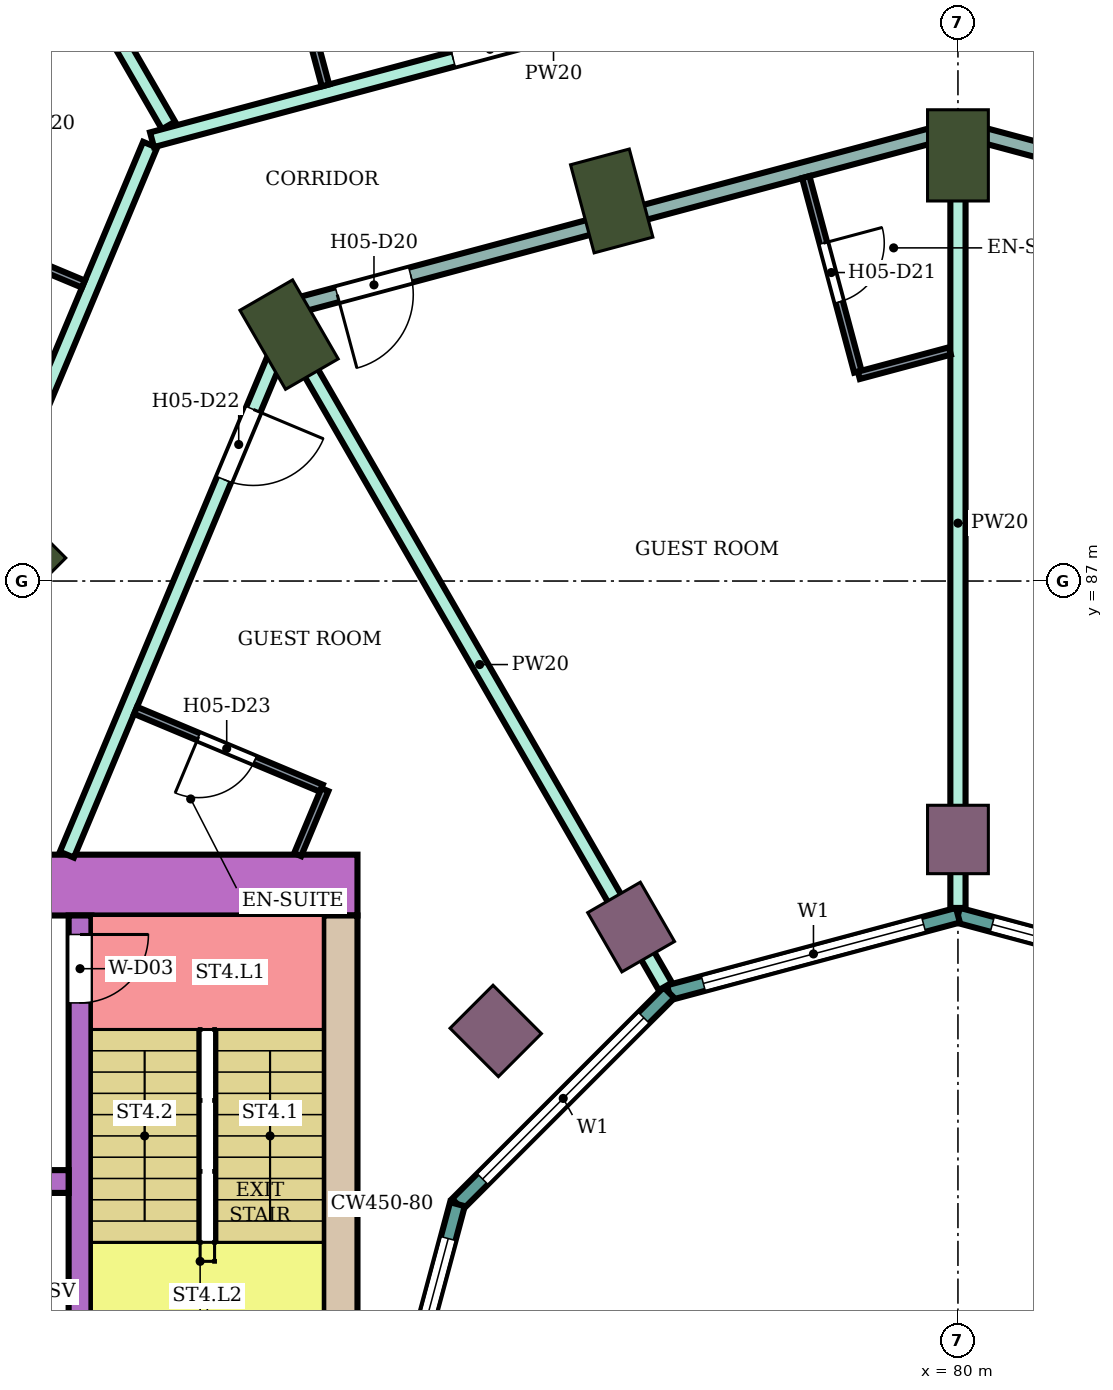
"""IFC4 building model, lengths in metres.
Left out: names, types, materials, properties, quantities, classifications, styles, units other than length and angle.
Written with IfcOpenShell. Run it as: python <this file> out.ifc"""

import sys

from ifc_helpers import new_model, si_unit, direction, frame, frame_2d, origin, origin_2d, place, context, subcontext, project, spatial, rectangle, extrude, element, fill, save


model = new_model("IFC4")
c1 = context("Model", 3, precision=1e-05, world=origin(), true_north=direction((0.0, 1.0)))
c2 = subcontext(c1, "Body", "Model", "MODEL_VIEW")
j1 = project(units=[si_unit("LENGTHUNIT", "METRE"), si_unit("PLANEANGLEUNIT", "RADIAN")], contexts=[c1])
p1 = place(None, origin())
s1 = spatial("IfcSite", under=j1, at=p1, CompositionType="ELEMENT")
p2 = place(p1, origin())
s2 = spatial("IfcBuilding", under=s1, at=p2, CompositionType="ELEMENT")
p3 = place(p2, frame((0.0, 0.0, 90.0)))
s3 = spatial("IfcBuildingStorey", under=s2, at=p3, CompositionType="ELEMENT", Elevation=90.0)
for number, where, z_axis, x_axis in (
    (1, (80.0, 92.6, 0.0), (0.0, 0.0, 1.0), (0.0, 1.0, 0.0)),
    (2, (75.445, 92.0, 0.0), (0.0, 0.0, 1.0), (-0.259, 0.966, 0.0)),
    (3, (71.2, 90.242, 0.0), (0.0, 0.0, 1.0), (-0.5, 0.866, 0.0)),
    (4, (67.555, 87.445, 0.0), (0.0, 0.0, 1.0), (-0.707, 0.707, 0.0)),
):
    element("IfcColumn", number, at=place(p3, frame(where, z_axis=z_axis, x_axis=x_axis)), inside=s3, PredefinedType="COLUMN", context=c2, shape_type="SweptSolid", body=[
        extrude(rectangle(XDim=1.2, YDim=0.8, at=origin_2d()), origin(), (0.0, 0.0, 1.0), 3.8),
    ])
for number, where, z_axis, x_axis in (
    (5, (80.0, 83.6, 0.0), (0.0, 0.0, 1.0), (0.0, 1.0, 0.0)),
    (6, (75.7, 82.448, 0.0), (0.0, 0.0, 1.0), (-0.5, 0.866, 0.0)),
    (7, (73.919, 81.081, 0.0), (0.0, 0.0, 1.0), (-0.707, 0.707, 0.0)),
):
    element("IfcColumn", number, at=place(p3, frame(where, z_axis=z_axis, x_axis=x_axis)), inside=s3, PredefinedType="COLUMN", context=c2, shape_type="SweptSolid", body=[
        extrude(rectangle(XDim=0.9, YDim=0.8, at=origin_2d()), origin(), (0.0, 0.0, 1.0), 3.8),
    ])
p4 = place(p3, frame((72.1, 83.0, 0.0), z_axis=(0.0, 0.0, 1.0), x_axis=(-1.0, 0.0, 0.0)))
e8 = element("IfcWall", 8, at=p4, inside=s3, PredefinedType="SHEAR", context=c2, shape_type="SweptSolid", body=[
    extrude(rectangle(XDim=14.7, YDim=0.8, at=frame_2d((7.35, 0.0))), origin(), (0.0, 0.0, 1.0), 3.48),
])
p5 = place(p4, frame((4.2, 0.0, 0.0)))
e9 = element("IfcOpeningElement", 9, at=p5, cuts=e8, PredefinedType="OPENING", context=c2, shape_type="SweptSolid", body=[
    extrude(rectangle(XDim=2.4, YDim=2.4, at=frame_2d((1.2, 1.2))), frame((0.0, 0.41, 0.0), z_axis=(0.0, -1.0, 0.0), x_axis=(1.0, 0.0, 0.0)), (0.0, 0.0, 1.0), 0.82),
])
p6 = place(p3, frame((71.875, 82.6, 0.0), z_axis=(0.0, 0.0, 1.0), x_axis=(0.0, -1.0, 0.0)))
e10 = element("IfcWall", 10, at=p6, inside=s3, PredefinedType="SHEAR", context=c2, shape_type="SweptSolid", body=[
    extrude(rectangle(XDim=7.6, YDim=0.45, at=frame_2d((3.8, 0.0))), origin(), (0.0, 0.0, 1.0), 3.48),
])
p7 = place(p3, frame((68.45, 82.6, 0.0), z_axis=(0.0, 0.0, 1.0), x_axis=(0.0, -1.0, 0.0)))
e11 = element("IfcWall", 11, at=p7, inside=s3, PredefinedType="SHEAR", context=c2, shape_type="SweptSolid", body=[
    extrude(rectangle(XDim=7.6, YDim=0.3, at=frame_2d((3.8, 0.0))), origin(), (0.0, 0.0, 1.0), 3.48),
])
p8 = place(p7, frame((0.25, 0.0, 0.0)))
e12 = element("IfcOpeningElement", 12, at=p8, cuts=e11, PredefinedType="OPENING", context=c2, shape_type="SweptSolid", body=[
    extrude(rectangle(XDim=0.9, YDim=2.1, at=frame_2d((0.45, 1.05))), frame((0.0, 0.16, 0.0), z_axis=(0.0, -1.0, 0.0), x_axis=(1.0, 0.0, 0.0)), (0.0, 0.0, 1.0), 0.32),
])
p9 = place(p3, frame((68.3, 79.1, 0.0), z_axis=(0.0, 0.0, 1.0), x_axis=(-1.0, 0.0, 0.0)))
e13 = element("IfcWall", 13, at=p9, inside=s3, PredefinedType="SHEAR", context=c2, shape_type="SweptSolid", body=[
    extrude(rectangle(XDim=10.9, YDim=0.3, at=frame_2d((5.45, 0.0))), origin(), (0.0, 0.0, 1.0), 3.48),
])
p10 = place(p9, frame((0.4, 0.0, 0.0)))
e14 = element("IfcOpeningElement", 14, at=p10, cuts=e13, PredefinedType="OPENING", context=c2, shape_type="SweptSolid", body=[
    extrude(rectangle(XDim=1.4, YDim=2.1, at=frame_2d((0.7, 1.05))), frame((0.0, 0.16, 0.0), z_axis=(0.0, -1.0, 0.0), x_axis=(1.0, 0.0, 0.0)), (0.0, 0.0, 1.0), 0.32),
])
p11 = place(p9, frame((5.4, 0.0, 0.0)))
e15 = element("IfcOpeningElement", 15, at=p11, cuts=e13, PredefinedType="OPENING", context=c2, shape_type="SweptSolid", body=[
    extrude(rectangle(XDim=1.4, YDim=2.1, at=frame_2d((0.7, 1.05))), frame((0.0, 0.16, 0.0), z_axis=(0.0, -1.0, 0.0), x_axis=(1.0, 0.0, 0.0)), (0.0, 0.0, 1.0), 0.32),
])
p12 = place(p9, frame((8.1, 0.0, 0.0)))
e16 = element("IfcOpeningElement", 16, at=p12, cuts=e13, PredefinedType="OPENING", context=c2, shape_type="SweptSolid", body=[
    extrude(rectangle(XDim=1.0, YDim=2.1, at=frame_2d((0.5, 1.05))), frame((0.0, 0.16, 0.0), z_axis=(0.0, -1.0, 0.0), x_axis=(1.0, 0.0, 0.0)), (0.0, 0.0, 1.0), 0.32),
])
p13 = place(p3, frame((83.802, 81.585, 0.0), z_axis=(0.0, 0.0, 1.0), x_axis=(-0.965933654434, 0.258789828301, 0.0)))
e17 = element("IfcWall", 17, at=p13, inside=s3, PredefinedType="NOTDEFINED", context=c2, shape_type="SweptSolid", body=[
    extrude(rectangle(XDim=3.936, YDim=0.2, at=frame_2d((1.968, 0.0))), origin(), (0.0, 0.0, 1.0), 3.8),
])
p14 = place(p13, frame((0.468, 0.0, 0.9)))
e18 = element("IfcOpeningElement", 18, at=p14, cuts=e17, PredefinedType="OPENING", context=c2, shape_type="SweptSolid", body=[
    extrude(rectangle(XDim=3.0, YDim=2.3, at=frame_2d((1.5, 1.15))), frame((0.0, 0.11, 0.0), z_axis=(0.0, -1.0, 0.0), x_axis=(1.0, 0.0, 0.0)), (0.0, 0.0, 1.0), 0.22),
])
p15 = place(p3, frame((80.0, 82.604, 0.0), z_axis=(0.0, 0.0, 1.0), x_axis=(-0.965933654434, -0.258789828301, 0.0)))
e19 = element("IfcWall", 19, at=p15, inside=s3, PredefinedType="NOTDEFINED", context=c2, shape_type="SweptSolid", body=[
    extrude(rectangle(XDim=3.936, YDim=0.2, at=frame_2d((1.968, 0.0))), origin(), (0.0, 0.0, 1.0), 3.8),
])
p16 = place(p15, frame((0.468, 0.0, 0.9)))
e20 = element("IfcOpeningElement", 20, at=p16, cuts=e19, PredefinedType="OPENING", context=c2, shape_type="SweptSolid", body=[
    extrude(rectangle(XDim=3.0, YDim=2.3, at=frame_2d((1.5, 1.15))), frame((0.0, 0.11, 0.0), z_axis=(0.0, -1.0, 0.0), x_axis=(1.0, 0.0, 0.0)), (0.0, 0.0, 1.0), 0.22),
])
p17 = place(p3, frame((76.198, 81.585, 0.0), z_axis=(0.0, 0.0, 1.0), x_axis=(-0.707106781187, -0.707106781187, 0.0)))
e21 = element("IfcWall", 21, at=p17, inside=s3, PredefinedType="NOTDEFINED", context=c2, shape_type="SweptSolid", body=[
    extrude(rectangle(XDim=3.936, YDim=0.2, at=frame_2d((1.968, 0.0))), origin(), (0.0, 0.0, 1.0), 3.8),
])
p18 = place(p17, frame((0.468, 0.0, 0.9)))
e22 = element("IfcOpeningElement", 22, at=p18, cuts=e21, PredefinedType="OPENING", context=c2, shape_type="SweptSolid", body=[
    extrude(rectangle(XDim=3.0, YDim=2.3, at=frame_2d((1.5, 1.15))), frame((0.0, 0.11, 0.0), z_axis=(0.0, -1.0, 0.0), x_axis=(1.0, 0.0, 0.0)), (0.0, 0.0, 1.0), 0.22),
])
p19 = place(p3, frame((73.415, 78.802, 0.0), z_axis=(0.0, 0.0, 1.0), x_axis=(-0.258789828301, -0.965933654434, 0.0)))
e23 = element("IfcWall", 23, at=p19, inside=s3, PredefinedType="NOTDEFINED", context=c2, shape_type="SweptSolid", body=[
    extrude(rectangle(XDim=3.936, YDim=0.2, at=frame_2d((1.968, 0.0))), origin(), (0.0, 0.0, 1.0), 3.8),
])
p20 = place(p19, frame((0.468, 0.0, 0.9)))
e24 = element("IfcOpeningElement", 24, at=p20, cuts=e23, PredefinedType="OPENING", context=c2, shape_type="SweptSolid", body=[
    extrude(rectangle(XDim=3.0, YDim=2.3, at=frame_2d((1.5, 1.15))), frame((0.0, 0.11, 0.0), z_axis=(0.0, -1.0, 0.0), x_axis=(1.0, 0.0, 0.0)), (0.0, 0.0, 1.0), 0.22),
])
p21 = place(p3, frame((66.085, 84.9, 0.0), z_axis=(0.0, 0.0, 1.0), x_axis=(0.386676248006, 0.922215527536, 0.0)))
e25 = element("IfcWall", 25, at=p21, inside=s3, PredefinedType="PARTITIONING", context=c2, shape_type="SweptSolid", body=[
    extrude(rectangle(XDim=8.5, YDim=0.2, at=frame_2d((4.25, 0.0))), origin(), (0.0, 0.0, 1.0), 3.35),
])
p22 = place(p21, frame((3.748, 0.0, 0.0)))
e26 = element("IfcOpeningElement", 26, at=p22, cuts=e25, PredefinedType="OPENING", context=c2, shape_type="SweptSolid", body=[
    extrude(rectangle(XDim=1.0, YDim=2.1, at=frame_2d((0.5, 1.05))), frame((0.0, 0.11, 0.0), z_axis=(0.0, -1.0, 0.0), x_axis=(1.0, 0.0, 0.0)), (0.0, 0.0, 1.0), 0.22),
])
p23 = place(p3, frame((67.104, 97.343, 0.0), z_axis=(0.0, 0.0, 1.0), x_axis=(0.499799615385, -0.866141064989, 0.0)))
e27 = element("IfcWall", 27, at=p23, inside=s3, PredefinedType="PARTITIONING", context=c2, shape_type="SweptSolid", body=[
    extrude(rectangle(XDim=5.021, YDim=0.2, at=frame_2d((2.511, 0.0))), origin(), (0.0, 0.0, 1.0), 3.35),
])
p24 = place(p3, frame((68.277, 83.4, 0.0), z_axis=(0.0, 0.0, 1.0), x_axis=(0.386454861164, 0.922308321703, 0.0)))
e28 = element("IfcWall", 28, at=p24, inside=s3, PredefinedType="PARTITIONING", context=c2, shape_type="SweptSolid", body=[
    extrude(rectangle(XDim=7.762, YDim=0.2, at=frame_2d((3.881, 0.0))), origin(), (0.0, 0.0, 1.0), 3.35),
])
p25 = place(p24, frame((5.351, 0.0, 0.0)))
e29 = element("IfcOpeningElement", 29, at=p25, cuts=e28, PredefinedType="OPENING", context=c2, shape_type="SweptSolid", body=[
    extrude(rectangle(XDim=1.0, YDim=2.1, at=frame_2d((0.5, 1.05))), frame((0.0, 0.11, 0.0), z_axis=(0.0, -1.0, 0.0), x_axis=(1.0, 0.0, 0.0)), (0.0, 0.0, 1.0), 0.22),
])
p26 = place(p3, frame((69.397, 92.805, 0.0), z_axis=(0.0, 0.0, 1.0), x_axis=(0.96596468683, 0.258673972015, 0.0)))
e30 = element("IfcWall", 30, at=p26, inside=s3, PredefinedType="PARTITIONING", context=c2, shape_type="SweptSolid", body=[
    extrude(rectangle(XDim=10.937, YDim=0.2, at=frame_2d((5.469, 0.0))), origin(), (0.0, 0.0, 1.0), 3.35),
])
p27 = place(p26, frame((6.163, 0.0, 0.0)))
e31 = element("IfcOpeningElement", 31, at=p27, cuts=e30, PredefinedType="OPENING", context=c2, shape_type="SweptSolid", body=[
    extrude(rectangle(XDim=1.0, YDim=2.1, at=frame_2d((0.5, 1.05))), frame((0.0, 0.11, 0.0), z_axis=(0.0, -1.0, 0.0), x_axis=(1.0, 0.0, 0.0)), (0.0, 0.0, 1.0), 0.22),
])
p28 = place(p26, frame((4.103, 0.0, 0.0)))
e32 = element("IfcOpeningElement", 32, at=p28, cuts=e30, PredefinedType="OPENING", context=c2, shape_type="SweptSolid", body=[
    extrude(rectangle(XDim=1.0, YDim=2.1, at=frame_2d((0.5, 1.05))), frame((0.0, 0.11, 0.0), z_axis=(0.0, -1.0, 0.0), x_axis=(1.0, 0.0, 0.0)), (0.0, 0.0, 1.0), 0.22),
])
p29 = place(p3, frame((71.264, 90.135, 0.0), z_axis=(0.0, 0.0, 1.0), x_axis=(0.499791624077, -0.866145676259, 0.0)))
e33 = element("IfcWall", 33, at=p29, inside=s3, PredefinedType="PARTITIONING", context=c2, shape_type="SweptSolid", body=[
    extrude(rectangle(XDim=9.778, YDim=0.2, at=frame_2d((4.889, 0.0))), origin(), (0.0, 0.0, 1.0), 3.35),
])
p30 = place(p3, frame((71.303, 90.625, 0.0), z_axis=(0.0, 0.0, 1.0), x_axis=(0.965971868307, 0.258647152776, 0.0)))
e34 = element("IfcWall", 34, at=p30, inside=s3, PredefinedType="PARTITIONING", context=c2, shape_type="SweptSolid", body=[
    extrude(rectangle(XDim=8.874, YDim=0.2, at=frame_2d((4.437, 0.0))), origin(), (0.0, 0.0, 1.0), 2.98),
])
p31 = place(p30, frame((0.55, 0.0, 0.0)))
e35 = element("IfcOpeningElement", 35, at=p31, cuts=e34, PredefinedType="OPENING", context=c2, shape_type="SweptSolid", body=[
    extrude(rectangle(XDim=1.0, YDim=2.1, at=frame_2d((0.5, 1.05))), frame((0.0, 0.11, 0.0), z_axis=(0.0, -1.0, 0.0), x_axis=(1.0, 0.0, 0.0)), (0.0, 0.0, 1.0), 0.22),
])
p32 = place(p3, frame((80.0, 82.699, 0.0), z_axis=(0.0, 0.0, 1.0), x_axis=(0.0, 1.0, 0.0)))
e36 = element("IfcWall", 36, at=p32, inside=s3, PredefinedType="PARTITIONING", context=c2, shape_type="SweptSolid", body=[
    extrude(rectangle(XDim=10.125, YDim=0.2, at=frame_2d((5.062, 0.0))), origin(), (0.0, 0.0, 1.0), 3.35),
])
p33 = place(p3, frame((80.0, 92.954, 0.0), z_axis=(0.0, 0.0, 1.0), x_axis=(0.965932194462, -0.258795277586, 0.0)))
e37 = element("IfcWall", 37, at=p33, inside=s3, PredefinedType="PARTITIONING", context=c2, shape_type="SweptSolid", body=[
    extrude(rectangle(XDim=8.934, YDim=0.2, at=frame_2d((4.467, 0.0))), origin(), (0.0, 0.0, 1.0), 2.98),
])
p34 = place(p33, frame((3.302, 0.0, 0.0)))
e38 = element("IfcOpeningElement", 38, at=p34, cuts=e37, PredefinedType="OPENING", context=c2, shape_type="SweptSolid", body=[
    extrude(rectangle(XDim=0.9, YDim=2.1, at=frame_2d((0.45, 1.05))), frame((0.0, 0.11, 0.0), z_axis=(0.0, -1.0, 0.0), x_axis=(1.0, 0.0, 0.0)), (0.0, 0.0, 1.0), 0.22),
])
p35 = place(p3, frame((80.0, 95.648, 0.0), z_axis=(0.0, 0.0, 1.0), x_axis=(0.965852259202, -0.259093445292, 0.0)))
e39 = element("IfcWall", 39, at=p35, inside=s3, PredefinedType="PARTITIONING", context=c2, shape_type="SweptSolid", body=[
    extrude(rectangle(XDim=10.597, YDim=0.2, at=frame_2d((5.298, 0.0))), origin(), (0.0, 0.0, 1.0), 3.35),
])
p36 = place(p35, frame((5.875, 0.0, 0.0)))
e40 = element("IfcOpeningElement", 40, at=p36, cuts=e39, PredefinedType="OPENING", context=c2, shape_type="SweptSolid", body=[
    extrude(rectangle(XDim=1.0, YDim=2.1, at=frame_2d((0.5, 1.05))), frame((0.0, 0.11, 0.0), z_axis=(0.0, -1.0, 0.0), x_axis=(1.0, 0.0, 0.0)), (0.0, 0.0, 1.0), 0.22),
])
p37 = place(p3, frame((66.003, 91.95, 0.0), z_axis=(0.0, 0.0, 1.0), x_axis=(0.922350337209, -0.386354572188, 0.0)))
e41 = element("IfcWall", 41, at=p37, inside=s3, PredefinedType="PARTITIONING", context=c2, shape_type="SweptSolid", body=[
    extrude(rectangle(XDim=2.7, YDim=0.1, at=frame_2d((1.35, 0.0))), origin(), (0.0, 0.0, 1.0), 3.35),
])
p38 = place(p3, frame((69.181, 85.298, 0.0), z_axis=(0.0, 0.0, 1.0), x_axis=(0.922377635784, -0.38628939541, 0.0)))
e42 = element("IfcWall", 42, at=p38, inside=s3, PredefinedType="PARTITIONING", context=c2, shape_type="SweptSolid", body=[
    extrude(rectangle(XDim=2.65, YDim=0.1, at=frame_2d((1.325, 0.0))), origin(), (0.0, 0.0, 1.0), 3.35),
])
p39 = place(p38, frame((0.9, 0.0, 0.0)))
e43 = element("IfcOpeningElement", 43, at=p39, cuts=e42, PredefinedType="OPENING", context=c2, shape_type="SweptSolid", body=[
    extrude(rectangle(XDim=0.8, YDim=2.1, at=frame_2d((0.4, 1.05))), frame((0.0, 0.06, 0.0), z_axis=(0.0, -1.0, 0.0), x_axis=(1.0, 0.0, 0.0)), (0.0, 0.0, 1.0), 0.12),
])
p40 = place(p3, frame((70.981, 96.128, 0.0), z_axis=(0.0, 0.0, 1.0), x_axis=(0.25867580527, -0.965964195904, 0.0)))
e44 = element("IfcWall", 44, at=p40, inside=s3, PredefinedType="PARTITIONING", context=c2, shape_type="SweptSolid", body=[
    extrude(rectangle(XDim=2.699, YDim=0.1, at=frame_2d((1.35, 0.0))), origin(), (0.0, 0.0, 1.0), 3.35),
])
p41 = place(p3, frame((71.313, 83.4, 0.0), z_axis=(0.0, 0.0, 1.0), x_axis=(0.386148512695, 0.922436624459, 0.0)))
e45 = element("IfcWall", 45, at=p41, inside=s3, PredefinedType="PARTITIONING", context=c2, shape_type="SweptSolid", body=[
    extrude(rectangle(XDim=0.927, YDim=0.1, at=frame_2d((0.463, 0.0))), origin(), (0.0, 0.0, 1.0), 3.35),
])
p42 = place(p3, frame((77.998, 92.314, 0.0), z_axis=(0.0, 0.0, 1.0), x_axis=(0.258608674509, -0.965982170368, 0.0)))
e46 = element("IfcWall", 46, at=p42, inside=s3, PredefinedType="PARTITIONING", context=c2, shape_type="SweptSolid", body=[
    extrude(rectangle(XDim=2.65, YDim=0.1, at=frame_2d((1.325, 0.0))), origin(), (0.0, 0.0, 1.0), 3.35),
])
p43 = place(p42, frame((0.9, 0.0, 0.0)))
e47 = element("IfcOpeningElement", 47, at=p43, cuts=e46, PredefinedType="OPENING", context=c2, shape_type="SweptSolid", body=[
    extrude(rectangle(XDim=0.8, YDim=2.1, at=frame_2d((0.4, 1.05))), frame((0.0, 0.06, 0.0), z_axis=(0.0, -1.0, 0.0), x_axis=(1.0, 0.0, 0.0)), (0.0, 0.0, 1.0), 0.12),
])
p44 = place(p3, frame((78.696, 89.706, 0.0), z_axis=(0.0, 0.0, 1.0), x_axis=(0.966002513606, 0.258532674351, 0.0)))
e48 = element("IfcWall", 48, at=p44, inside=s3, PredefinedType="PARTITIONING", context=c2, shape_type="SweptSolid", body=[
    extrude(rectangle(XDim=1.24, YDim=0.1, at=frame_2d((0.62, 0.0))), origin(), (0.0, 0.0, 1.0), 3.35),
])
p45 = place(p14, origin())
e49 = element("IfcWindow", 49, at=p45, inside=s3, PartitioningType="SINGLE_PANEL", PredefinedType="WINDOW", context=c2, shape_type="SweptSolid", body=[
    extrude(rectangle(XDim=3.0, YDim=2.3, at=frame_2d((1.5, 1.15))), frame((0.0, 0.03, 0.0), z_axis=(0.0, -1.0, 0.0), x_axis=(1.0, 0.0, 0.0)), (0.0, 0.0, 1.0), 0.06),
])
fill(e18, e49)
p46 = place(p16, origin())
e50 = element("IfcWindow", 50, at=p46, inside=s3, PartitioningType="SINGLE_PANEL", PredefinedType="WINDOW", context=c2, shape_type="SweptSolid", body=[
    extrude(rectangle(XDim=3.0, YDim=2.3, at=frame_2d((1.5, 1.15))), frame((0.0, 0.03, 0.0), z_axis=(0.0, -1.0, 0.0), x_axis=(1.0, 0.0, 0.0)), (0.0, 0.0, 1.0), 0.06),
])
fill(e20, e50)
p47 = place(p18, origin())
e51 = element("IfcWindow", 51, at=p47, inside=s3, PartitioningType="SINGLE_PANEL", PredefinedType="WINDOW", context=c2, shape_type="SweptSolid", body=[
    extrude(rectangle(XDim=3.0, YDim=2.3, at=frame_2d((1.5, 1.15))), frame((0.0, 0.03, 0.0), z_axis=(0.0, -1.0, 0.0), x_axis=(1.0, 0.0, 0.0)), (0.0, 0.0, 1.0), 0.06),
])
fill(e22, e51)
p48 = place(p20, origin())
e52 = element("IfcWindow", 52, at=p48, inside=s3, PartitioningType="SINGLE_PANEL", PredefinedType="WINDOW", context=c2, shape_type="SweptSolid", body=[
    extrude(rectangle(XDim=3.0, YDim=2.3, at=frame_2d((1.5, 1.15))), frame((0.0, 0.03, 0.0), z_axis=(0.0, -1.0, 0.0), x_axis=(1.0, 0.0, 0.0)), (0.0, 0.0, 1.0), 0.06),
])
fill(e24, e52)
p49 = place(p28, origin())
e53 = element("IfcDoor", 53, at=p49, inside=s3, OperationType="SINGLE_SWING_RIGHT", PredefinedType="DOOR", context=c2, shape_type="SweptSolid", body=[
    extrude(rectangle(XDim=1.0, YDim=2.1, at=frame_2d((0.5, 1.05))), frame((0.0, 0.025, 0.0), z_axis=(0.0, -1.0, 0.0), x_axis=(1.0, 0.0, 0.0)), (0.0, 0.0, 1.0), 0.05),
])
fill(e32, e53)
p50 = place(p31, frame((1.0, 0.0, 0.0), z_axis=(0.0, 0.0, 1.0), x_axis=(-1.0, 0.0, 0.0)))
e54 = element("IfcDoor", 54, at=p50, inside=s3, OperationType="SINGLE_SWING_RIGHT", PredefinedType="DOOR", context=c2, shape_type="SweptSolid", body=[
    extrude(rectangle(XDim=1.0, YDim=2.1, at=frame_2d((0.5, 1.05))), frame((0.0, 0.025, 0.0), z_axis=(0.0, -1.0, 0.0), x_axis=(1.0, 0.0, 0.0)), (0.0, 0.0, 1.0), 0.05),
])
fill(e35, e54)
p51 = place(p43, origin())
e55 = element("IfcDoor", 55, at=p51, inside=s3, OperationType="SINGLE_SWING_LEFT", PredefinedType="DOOR", context=c2, shape_type="SweptSolid", body=[
    extrude(rectangle(XDim=0.8, YDim=2.1, at=frame_2d((0.4, 1.05))), frame((0.0, 0.025, 0.0), z_axis=(0.0, -1.0, 0.0), x_axis=(1.0, 0.0, 0.0)), (0.0, 0.0, 1.0), 0.05),
])
fill(e47, e55)
p52 = place(p25, frame((1.0, 0.0, 0.0), z_axis=(0.0, 0.0, 1.0), x_axis=(-1.0, 0.0, 0.0)))
e56 = element("IfcDoor", 56, at=p52, inside=s3, OperationType="SINGLE_SWING_LEFT", PredefinedType="DOOR", context=c2, shape_type="SweptSolid", body=[
    extrude(rectangle(XDim=1.0, YDim=2.1, at=frame_2d((0.5, 1.05))), frame((0.0, 0.025, 0.0), z_axis=(0.0, -1.0, 0.0), x_axis=(1.0, 0.0, 0.0)), (0.0, 0.0, 1.0), 0.05),
])
fill(e29, e56)
p53 = place(p39, frame((0.8, 0.0, 0.0), z_axis=(0.0, 0.0, 1.0), x_axis=(-1.0, 0.0, 0.0)))
e57 = element("IfcDoor", 57, at=p53, inside=s3, OperationType="SINGLE_SWING_RIGHT", PredefinedType="DOOR", context=c2, shape_type="SweptSolid", body=[
    extrude(rectangle(XDim=0.8, YDim=2.1, at=frame_2d((0.4, 1.05))), frame((0.0, 0.025, 0.0), z_axis=(0.0, -1.0, 0.0), x_axis=(1.0, 0.0, 0.0)), (0.0, 0.0, 1.0), 0.05),
])
fill(e43, e57)
p54 = place(p8, origin())
e58 = element("IfcDoor", 58, at=p54, inside=s3, OperationType="SINGLE_SWING_LEFT", PredefinedType="DOOR", context=c2, shape_type="SweptSolid", body=[
    extrude(rectangle(XDim=0.9, YDim=2.1, at=frame_2d((0.45, 1.05))), frame((0.0, 0.025, 0.0), z_axis=(0.0, -1.0, 0.0), x_axis=(1.0, 0.0, 0.0)), (0.0, 0.0, 1.0), 0.05),
])
fill(e12, e58)
save(model, sys.argv[1])
